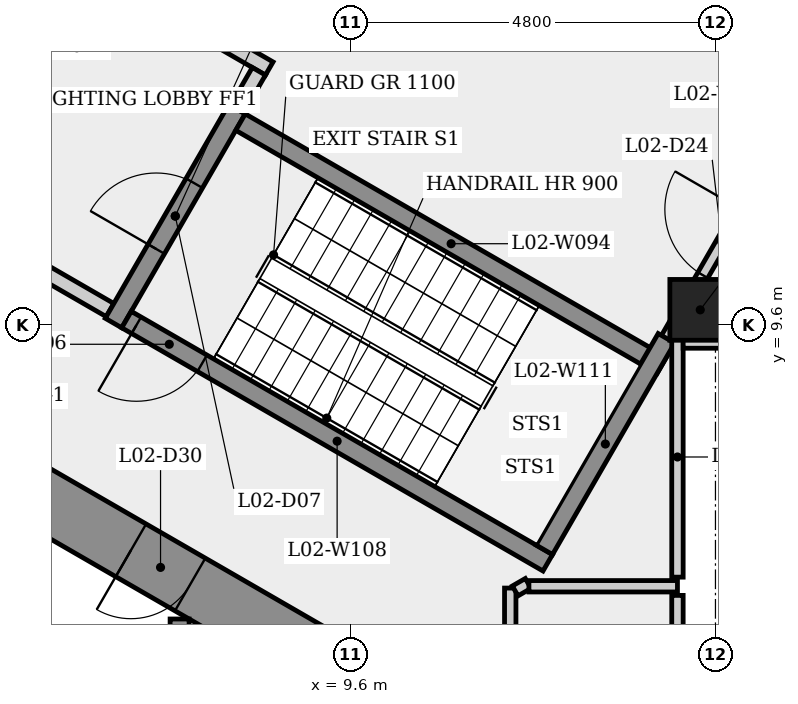
"""IFC4 building model, lengths in metres.
Left out: names, types, materials, properties, quantities, classifications, styles, units other than length and angle.
Written with IfcOpenShell. Run it as: python <this file> out.ifc"""

import sys

from ifc_helpers import new_model, si_unit, direction, frame, frame_2d, origin, origin_2d, place, context, subcontext, project, spatial, rectangle, extrude, element, fill, save


model = new_model("IFC4")
c1 = context("Model", 3, precision=1e-05, world=origin(), true_north=direction((0.0, 1.0)))
c2 = subcontext(c1, "Body", "Model", "MODEL_VIEW")
j1 = project(units=[si_unit("LENGTHUNIT", "METRE"), si_unit("PLANEANGLEUNIT", "RADIAN")], contexts=[c1])
p1 = place(None, origin())
s1 = spatial("IfcSite", under=j1, at=p1, CompositionType="ELEMENT")
p2 = place(p1, origin())
s2 = spatial("IfcBuilding", under=s1, at=p2, CompositionType="ELEMENT")
p3 = place(p2, frame((0.0, 0.0, 11.5)))
s3 = spatial("IfcBuildingStorey", under=s2, at=p3, CompositionType="ELEMENT", Elevation=11.5)
p4 = place(p3, frame((9.3, 5.138, 0.0), z_axis=(0.0, 0.0, 1.0), x_axis=(-0.866023993627, 0.500002442456, 0.0)))
e1 = element("IfcWall", 1, at=p4, inside=s3, PredefinedType="SHEAR", context=c2, shape_type="SweptSolid", body=[
    extrude(rectangle(XDim=10.97, YDim=0.8, at=frame_2d((5.485, 0.0))), origin(), (0.0, 0.0, 1.0), 4.5),
])
p5 = place(p4, frame((8.326, 0.0, 0.0)))
e2 = element("IfcOpeningElement", 2, at=p5, cuts=e1, PredefinedType="OPENING", context=c2, shape_type="SweptSolid", body=[
    extrude(rectangle(XDim=0.9, YDim=2.1, at=frame_2d((0.45, 1.05))), frame((0.0, 0.41, 0.0), z_axis=(0.0, -1.0, 0.0), x_axis=(1.0, 0.0, 0.0)), (0.0, 0.0, 1.0), 0.82),
])
p6 = place(p4, frame((2.091, 0.0, 0.0)))
e3 = element("IfcOpeningElement", 3, at=p6, cuts=e1, PredefinedType="OPENING", context=c2, shape_type="SweptSolid", body=[
    extrude(rectangle(XDim=0.9, YDim=2.1, at=frame_2d((0.45, 1.05))), frame((0.0, 0.41, 0.0), z_axis=(0.0, -1.0, 0.0), x_axis=(1.0, 0.0, 0.0)), (0.0, 0.0, 1.0), 0.82),
])
p7 = place(p3, frame((14.2, 9.798, 0.0), z_axis=(0.0, 0.0, 1.0), x_axis=(1.0, 0.0, 0.0)))
e4 = element("IfcColumn", 4, at=p7, inside=s3, PredefinedType="COLUMN", context=c2, shape_type="SweptSolid", body=[
    extrude(rectangle(XDim=0.8, YDim=0.8, at=origin_2d()), origin(), (0.0, 0.0, 1.0), 4.5),
])
p8 = place(p3, frame((4.459, 15.323, 0.0), z_axis=(0.0, 0.0, 1.0), x_axis=(0.866016039709, -0.500016218704, 0.0)))
e5 = element("IfcWall", 5, at=p8, inside=s3, PredefinedType="PARTITIONING", context=c2, shape_type="SweptSolid", body=[
    extrude(rectangle(XDim=4.7, YDim=0.2, at=frame_2d((2.35, 0.0))), origin(), (0.0, 0.0, 1.0), 4.1),
])
p9 = place(p3, frame((6.435, 9.795, 0.0), z_axis=(0.0, 0.0, 1.0), x_axis=(-0.866012907634, 0.500021643343, 0.0)))
e6 = element("IfcWall", 6, at=p9, inside=s3, PredefinedType="PARTITIONING", context=c2, shape_type="SweptSolid", body=[
    extrude(rectangle(XDim=4.45, YDim=0.2, at=frame_2d((2.225, 0.0))), origin(), (0.0, 0.0, 1.0), 4.1),
])
p10 = place(p9, frame((1.675, 0.0, 0.0)))
e7 = element("IfcOpeningElement", 7, at=p10, cuts=e6, PredefinedType="OPENING", context=c2, shape_type="SweptSolid", body=[
    extrude(rectangle(XDim=1.1, YDim=2.1, at=frame_2d((0.55, 1.05))), frame((0.0, 0.11, 0.0), z_axis=(0.0, -1.0, 0.0), x_axis=(1.0, 0.0, 0.0)), (0.0, 0.0, 1.0), 0.22),
])
p11 = place(p3, frame((6.48, 9.624, 0.0), z_axis=(0.0, 0.0, 1.0), x_axis=(0.500017246033, 0.866015446554, 0.0)))
e8 = element("IfcWall", 8, at=p11, inside=s3, PredefinedType="SHEAR", context=c2, shape_type="SweptSolid", body=[
    extrude(rectangle(XDim=3.25, YDim=0.25, at=frame_2d((1.625, 0.0))), origin(), (0.0, 0.0, 1.0), 4.1),
])
p12 = place(p11, frame((1.125, 0.0, 0.0)))
e9 = element("IfcOpeningElement", 9, at=p12, cuts=e8, PredefinedType="OPENING", context=c2, shape_type="SweptSolid", body=[
    extrude(rectangle(XDim=1.0, YDim=2.1, at=frame_2d((0.5, 1.05))), frame((0.0, 0.135, 0.0), z_axis=(0.0, -1.0, 0.0), x_axis=(1.0, 0.0, 0.0)), (0.0, 0.0, 1.0), 0.27),
])
p13 = place(p3, frame((7.35, 5.73, 0.0), z_axis=(0.0, 0.0, 1.0), x_axis=(0.0, -1.0, 0.0)))
e10 = element("IfcWall", 10, at=p13, inside=s3, PredefinedType="SHEAR", context=c2, shape_type="SweptSolid", body=[
    extrude(rectangle(XDim=3.805, YDim=0.25, at=frame_2d((1.903, 0.0))), origin(), (0.0, 0.0, 1.0), 4.1),
])
p14 = place(p3, frame((8.151, 12.268, 0.0), z_axis=(0.0, 0.0, 1.0), x_axis=(0.866025499775, -0.499999833739, 0.0)))
e11 = element("IfcWall", 11, at=p14, inside=s3, PredefinedType="SHEAR", context=c2, shape_type="SweptSolid", body=[
    extrude(rectangle(XDim=6.4, YDim=0.25, at=frame_2d((3.2, 0.0))), origin(), (0.0, 0.0, 1.0), 4.1),
])
p15 = place(p3, frame((8.393, 12.937, 0.0), z_axis=(0.0, 0.0, 1.0), x_axis=(-0.500065409566, -0.86598763626, 0.0)))
e12 = element("IfcWall", 12, at=p15, inside=s3, PredefinedType="PARTITIONING", context=c2, shape_type="SweptSolid", body=[
    extrude(rectangle(XDim=0.575, YDim=0.2, at=frame_2d((0.288, 0.0))), origin(), (0.0, 0.0, 1.0), 4.1),
])
p16 = place(p3, frame((11.7, 6.137, 0.0), z_axis=(0.0, 0.0, 1.0), x_axis=(0.0, -1.0, 0.0)))
e13 = element("IfcWall", 13, at=p16, inside=s3, PredefinedType="PARTITIONING", context=c2, shape_type="SweptSolid", body=[
    extrude(rectangle(XDim=12.125, YDim=0.15, at=frame_2d((6.062, 0.0))), origin(), (0.0, 0.0, 1.0), 4.1),
])
p17 = place(p16, frame((5.6, 0.0, 0.0)))
e14 = element("IfcOpeningElement", 14, at=p17, cuts=e13, PredefinedType="OPENING", context=c2, shape_type="SweptSolid", body=[
    extrude(rectangle(XDim=1.0, YDim=2.1, at=frame_2d((0.5, 1.05))), frame((0.0, 0.085, 0.0), z_axis=(0.0, -1.0, 0.0), x_axis=(1.0, 0.0, 0.0)), (0.0, 0.0, 1.0), 0.17),
])
p18 = place(p3, frame((11.936, 6.198, 0.0), z_axis=(0.0, 0.0, 1.0), x_axis=(-0.866103179807, -0.499865263774, 0.0)))
e15 = element("IfcWall", 15, at=p18, inside=s3, PredefinedType="PARTITIONING", context=c2, shape_type="SweptSolid", body=[
    extrude(rectangle(XDim=0.197, YDim=0.15, at=frame_2d((0.099, 0.0))), origin(), (0.0, 0.0, 1.0), 4.1),
])
p19 = place(p3, frame((12.194, 6.47, 0.0), z_axis=(0.0, 0.0, 1.0), x_axis=(-0.866025499775, 0.499999833739, 0.0)))
e16 = element("IfcWall", 16, at=p19, inside=s3, PredefinedType="SHEAR", context=c2, shape_type="SweptSolid", body=[
    extrude(rectangle(XDim=6.4, YDim=0.25, at=frame_2d((3.2, 0.0))), origin(), (0.0, 0.0, 1.0), 4.1),
])
p20 = place(p19, frame((5.25, 0.0, 0.0)))
e17 = element("IfcOpeningElement", 17, at=p20, cuts=e16, PredefinedType="OPENING", context=c2, shape_type="SweptSolid", body=[
    extrude(rectangle(XDim=1.0, YDim=2.1, at=frame_2d((0.5, 1.05))), frame((0.0, 0.135, 0.0), z_axis=(0.0, -1.0, 0.0), x_axis=(1.0, 0.0, 0.0)), (0.0, 0.0, 1.0), 0.27),
])
p21 = place(p3, frame((13.648, 9.239, 0.0), z_axis=(0.0, 0.0, 1.0), x_axis=(0.500000491645, 0.866025119933, 0.0)))
e18 = element("IfcWall", 18, at=p21, inside=s3, PredefinedType="PARTITIONING", context=c2, shape_type="SweptSolid", body=[
    extrude(rectangle(XDim=3.42, YDim=0.15, at=frame_2d((1.71, 0.0))), origin(), (0.0, 0.0, 1.0), 4.1),
])
p22 = place(p21, frame((1.173, 0.0, 0.0)))
e19 = element("IfcOpeningElement", 19, at=p22, cuts=e18, PredefinedType="OPENING", context=c2, shape_type="SweptSolid", body=[
    extrude(rectangle(XDim=1.0, YDim=2.1, at=frame_2d((0.5, 1.05))), frame((0.0, 0.085, 0.0), z_axis=(0.0, -1.0, 0.0), x_axis=(1.0, 0.0, 0.0)), (0.0, 0.0, 1.0), 0.17),
])
p23 = place(p3, frame((13.755, 9.424, 0.0), z_axis=(0.0, 0.0, 1.0), x_axis=(-0.500011789842, -0.866018596809, 0.0)))
e20 = element("IfcWall", 20, at=p23, inside=s3, PredefinedType="SHEAR", context=c2, shape_type="SweptSolid", body=[
    extrude(rectangle(XDim=3.214, YDim=0.25, at=frame_2d((1.607, 0.0))), origin(), (0.0, 0.0, 1.0), 4.1),
])
p24 = place(p3, frame((13.9, 6.041, 0.0), z_axis=(0.0, 0.0, 1.0), x_axis=(0.0, -1.0, 0.0)))
e21 = element("IfcWall", 21, at=p24, inside=s3, PredefinedType="PARTITIONING", context=c2, shape_type="SweptSolid", body=[
    extrude(rectangle(XDim=12.082, YDim=0.15, at=frame_2d((6.041, 0.0))), origin(), (0.0, 0.0, 1.0), 3.175),
])
p25 = place(p3, frame((13.9, 6.161, 0.0), z_axis=(0.0, 0.0, 1.0), x_axis=(-1.0, 0.0, 0.0)))
e22 = element("IfcWall", 22, at=p25, inside=s3, PredefinedType="PARTITIONING", context=c2, shape_type="SweptSolid", body=[
    extrude(rectangle(XDim=1.954, YDim=0.15, at=frame_2d((0.977, 0.0))), origin(), (0.0, 0.0, 1.0), 4.1),
])
p26 = place(p3, frame((13.9, 9.443, 0.0), z_axis=(0.0, 0.0, 1.0), x_axis=(0.0, -1.0, 0.0)))
e23 = element("IfcWall", 23, at=p26, inside=s3, PredefinedType="PARTITIONING", context=c2, shape_type="SweptSolid", body=[
    extrude(rectangle(XDim=3.162, YDim=0.15, at=frame_2d((1.581, 0.0))), origin(), (0.0, 0.0, 1.0), 3.175),
])
p27 = place(p3, frame((16.78, 9.368, 0.0), z_axis=(0.0, 0.0, 1.0), x_axis=(-1.0, 0.0, 0.0)))
e24 = element("IfcWall", 24, at=p27, inside=s3, PredefinedType="PARTITIONING", context=c2, shape_type="SweptSolid", body=[
    extrude(rectangle(XDim=2.805, YDim=0.15, at=frame_2d((1.402, 0.0))), origin(), (0.0, 0.0, 1.0), 3.175),
])
p28 = place(p20, origin())
e25 = element("IfcDoor", 25, at=p28, inside=s3, OperationType="SINGLE_SWING_RIGHT", PredefinedType="DOOR", context=c2, shape_type="SweptSolid", body=[
    extrude(rectangle(XDim=1.0, YDim=2.1, at=frame_2d((0.5, 1.05))), frame((0.0, 0.025, 0.0), z_axis=(0.0, -1.0, 0.0), x_axis=(1.0, 0.0, 0.0)), (0.0, 0.0, 1.0), 0.05),
])
fill(e17, e25)
p29 = place(p12, origin())
e26 = element("IfcDoor", 26, at=p29, inside=s3, OperationType="SINGLE_SWING_LEFT", PredefinedType="DOOR", context=c2, shape_type="SweptSolid", body=[
    extrude(rectangle(XDim=1.0, YDim=2.1, at=frame_2d((0.5, 1.05))), frame((0.0, 0.025, 0.0), z_axis=(0.0, -1.0, 0.0), x_axis=(1.0, 0.0, 0.0)), (0.0, 0.0, 1.0), 0.05),
])
fill(e9, e26)
p30 = place(p22, origin())
e27 = element("IfcDoor", 27, at=p30, inside=s3, OperationType="SINGLE_SWING_RIGHT", PredefinedType="DOOR", context=c2, shape_type="SweptSolid", body=[
    extrude(rectangle(XDim=1.0, YDim=2.1, at=frame_2d((0.5, 1.05))), frame((0.0, 0.025, 0.0), z_axis=(0.0, -1.0, 0.0), x_axis=(1.0, 0.0, 0.0)), (0.0, 0.0, 1.0), 0.05),
])
fill(e19, e27)
p31 = place(p6, origin())
e28 = element("IfcDoor", 28, at=p31, inside=s3, OperationType="SINGLE_SWING_RIGHT", PredefinedType="DOOR", context=c2, shape_type="SweptSolid", body=[
    extrude(rectangle(XDim=0.9, YDim=2.1, at=frame_2d((0.45, 1.05))), frame((0.0, 0.025, 0.0), z_axis=(0.0, -1.0, 0.0), x_axis=(1.0, 0.0, 0.0)), (0.0, 0.0, 1.0), 0.05),
])
fill(e3, e28)
save(model, sys.argv[1])
